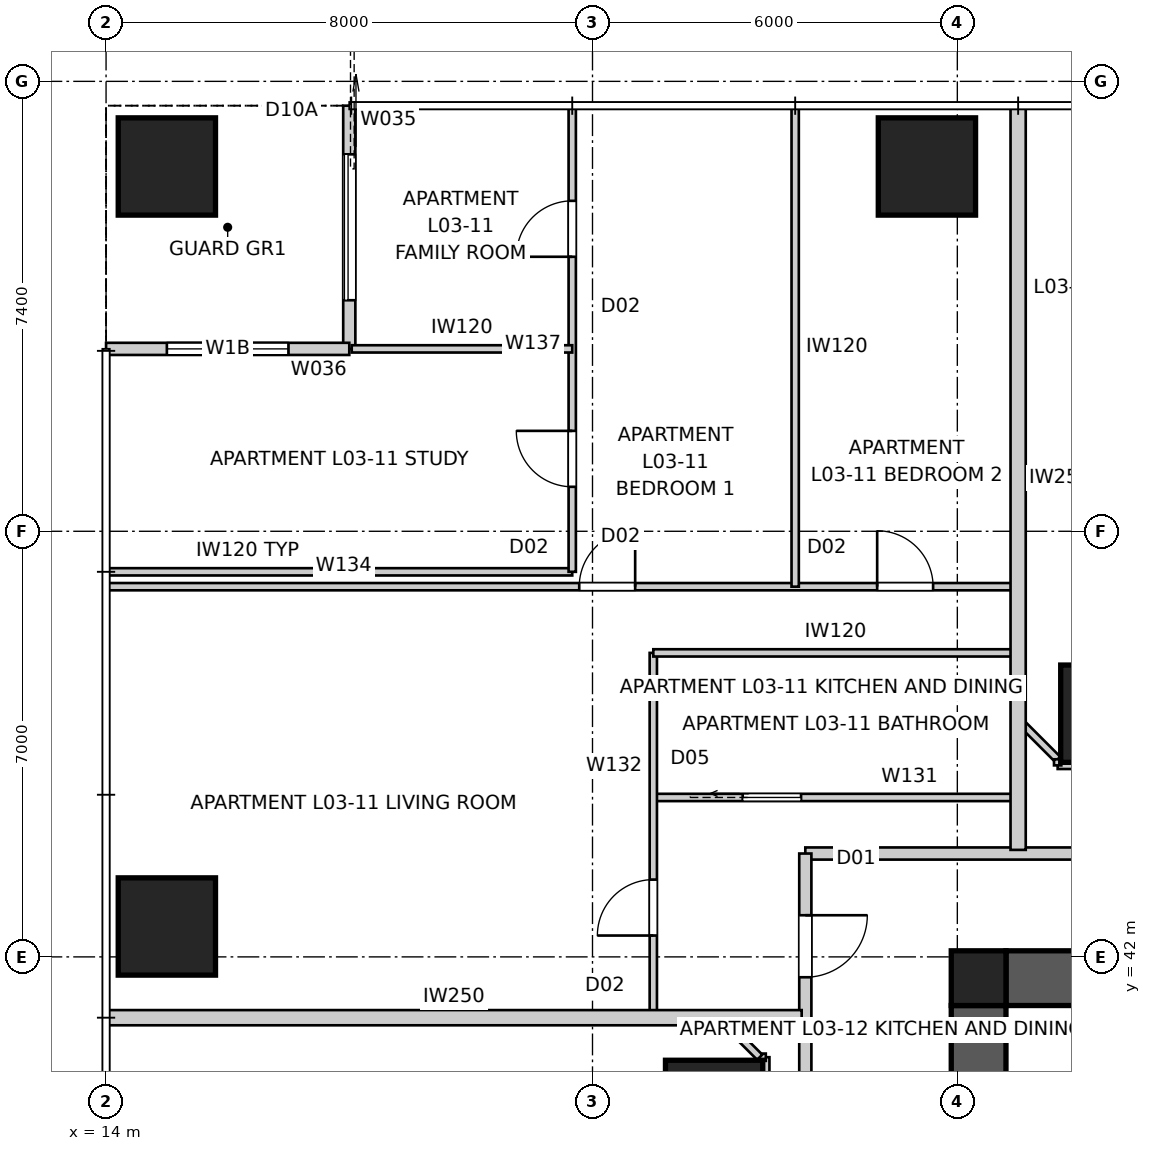
"""IFC4 building model, lengths in metres.
Left out: names, types, materials, properties, quantities, classifications, styles, units other than length and angle.
Written with IfcOpenShell. Run it as: python <this file> out.ifc"""

import sys

from ifc_helpers import new_model, si_unit, direction, frame, frame_2d, origin, origin_2d, place, context, subcontext, project, spatial, polyline, rectangle, outline, extrude, element, fill, save


model = new_model("IFC4")
c1 = context("Model", 3, precision=1e-05, world=origin(), true_north=direction((0.0, 1.0)))
c2 = subcontext(c1, "Body", "Model", "MODEL_VIEW")
j1 = project(units=[si_unit("LENGTHUNIT", "METRE"), si_unit("PLANEANGLEUNIT", "RADIAN")], contexts=[c1])
p1 = place(None, origin())
s1 = spatial("IfcSite", under=j1, at=p1, CompositionType="ELEMENT")
p2 = place(p1, origin())
s2 = spatial("IfcBuilding", under=s1, at=p2, CompositionType="ELEMENT")
p3 = place(p2, frame((0.0, 0.0, 15.0)))
s3 = spatial("IfcBuildingStorey", under=s2, at=p3, CompositionType="ELEMENT", Elevation=15.0)
p4 = place(p3, frame((28.8, 41.65, 0.0), z_axis=(0.0, 0.0, 1.0), x_axis=(1.0, 0.0, 0.0)))
e1 = element("IfcWall", 1, at=p4, inside=s3, PredefinedType="SHEAR", context=c2, shape_type="SweptSolid", body=[
    extrude(outline(polyline([(0.0, -0.45), (22.4, -0.45), (22.4, -0.025), (22.85, -0.025), (22.85, 0.025), (22.4, 0.025), (22.4, 0.45), (0.0, 0.45), (0.0, 0.025), (-0.45, 0.025), (-0.45, -0.025), (0.0, -0.025), (0.0, -0.45)])), origin(), (0.0, 0.0, 1.0), 3.4),
])
p5 = place(p3, frame((28.35, 41.2, 0.0), z_axis=(0.0, 0.0, 1.0), x_axis=(0.0, -1.0, 0.0)))
e2 = element("IfcWall", 2, at=p5, inside=s3, PredefinedType="SHEAR", context=c2, shape_type="SweptSolid", body=[
    extrude(outline(polyline([(0.0, -0.45), (22.4, -0.45), (22.4, -0.025), (22.85, -0.025), (22.85, 0.025), (22.4, 0.025), (22.4, 0.45), (0.0, 0.45), (0.0, 0.025), (-0.45, 0.025), (-0.45, -0.025), (0.0, -0.025), (0.0, -0.45)])), origin(), (0.0, 0.0, 1.0), 3.4),
])
p6 = place(p5, frame((11.14, 0.0, 0.0)))
e3 = element("IfcOpeningElement", 3, at=p6, cuts=e2, PredefinedType="OPENING", context=c2, shape_type="SweptSolid", body=[
    extrude(rectangle(XDim=1.02, YDim=2.4, at=frame_2d((0.51, 1.2))), frame((0.0, 0.46, 0.0), z_axis=(0.0, -1.0, 0.0), x_axis=(1.0, 0.0, 0.0)), (0.0, 0.0, 1.0), 0.92),
])
p7 = place(p3, frame((28.35, 41.65, 0.0), z_axis=(0.0, 0.0, 1.0), x_axis=(1.0, 0.0, 0.0)))
e4 = element("IfcColumn", 4, at=p7, inside=s3, PredefinedType="COLUMN", context=c2, shape_type="SweptSolid", body=[
    extrude(rectangle(XDim=0.9, YDim=0.9, at=origin_2d()), origin(), (0.0, 0.0, 1.0), 3.4),
])
for number, where, z_axis, x_axis in (
    (5, (27.5, 55.0, 0.0), (0.0, 0.0, 1.0), (1.0, 0.0, 0.0)),
    (6, (15.0, 55.0, 0.0), (0.0, 0.0, 1.0), (1.0, 0.0, 0.0)),
    (7, (15.0, 42.5, 0.0), (0.0, 0.0, 1.0), (1.0, 0.0, 0.0)),
    (8, (30.5, 46.0, 0.0), (0.0, 0.0, 1.0), (1.0, 0.0, 0.0)),
    (9, (24.0, 39.5, 0.0), (0.0, 0.0, 1.0), (1.0, 0.0, 0.0)),
):
    element("IfcColumn", number, at=place(p3, frame(where, z_axis=z_axis, x_axis=x_axis)), inside=s3, PredefinedType="COLUMN", context=c2, shape_type="SweptSolid", body=[
        extrude(rectangle(XDim=1.6, YDim=1.6, at=origin_2d()), origin(), (0.0, 0.0, 1.0), 3.4),
    ])
p8 = place(p3, frame((18.0, 56.0, 0.0), z_axis=(0.0, 0.0, 1.0), x_axis=(0.0, -1.0, 0.0)))
e10 = element("IfcWall", 10, at=p8, inside=s3, PredefinedType="SOLIDWALL", context=c2, shape_type="SweptSolid", body=[
    extrude(rectangle(XDim=4.0, YDim=0.2, at=frame_2d((2.0, 0.0))), origin(), (0.0, 0.0, 1.0), 3.25),
])
p9 = place(p8, frame((0.8, 0.0, 0.0)))
e11 = element("IfcOpeningElement", 11, at=p9, cuts=e10, PredefinedType="OPENING", context=c2, shape_type="SweptSolid", body=[
    extrude(rectangle(XDim=2.4, YDim=2.1, at=frame_2d((1.2, 1.05))), frame((0.0, 0.11, 0.0), z_axis=(0.0, -1.0, 0.0), x_axis=(1.0, 0.0, 0.0)), (0.0, 0.0, 1.0), 0.22),
])
p10 = place(p3, frame((18.0, 52.0, 0.0), z_axis=(0.0, 0.0, 1.0), x_axis=(-1.0, 0.0, 0.0)))
e12 = element("IfcWall", 12, at=p10, inside=s3, PredefinedType="SOLIDWALL", context=c2, shape_type="SweptSolid", body=[
    extrude(rectangle(XDim=4.0, YDim=0.2, at=frame_2d((2.0, 0.0))), origin(), (0.0, 0.0, 1.0), 3.25),
])
p11 = place(p10, frame((1.0, 0.0, 0.45)))
e13 = element("IfcOpeningElement", 13, at=p11, cuts=e12, PredefinedType="OPENING", context=c2, shape_type="SweptSolid", body=[
    extrude(rectangle(XDim=2.0, YDim=1.8, at=frame_2d((1.0, 0.9))), frame((0.0, 0.11, 0.0), z_axis=(0.0, -1.0, 0.0), x_axis=(1.0, 0.0, 0.0)), (0.0, 0.0, 1.0), 0.22),
])
p12 = place(p3, frame((54.5, 43.7, 0.0), z_axis=(0.0, 0.0, 1.0), x_axis=(-1.0, 0.0, 0.0)))
e14 = element("IfcWall", 14, at=p12, inside=s3, PredefinedType="PARTITIONING", context=c2, shape_type="SweptSolid", body=[
    extrude(rectangle(XDim=29.0, YDim=0.2, at=frame_2d((14.5, 0.0))), origin(), (0.0, 0.0, 1.0), 3.25),
])
p13 = place(p12, frame((22.253, 0.0, 0.0)))
e15 = element("IfcOpeningElement", 15, at=p13, cuts=e14, PredefinedType="OPENING", context=c2, shape_type="SweptSolid", body=[
    extrude(rectangle(XDim=1.02, YDim=2.34, at=frame_2d((0.51, 1.17))), frame((0.0, 0.11, 0.0), z_axis=(0.0, -1.0, 0.0), x_axis=(1.0, 0.0, 0.0)), (0.0, 0.0, 1.0), 0.22),
])
p14 = place(p12, frame((5.393, 0.0, 0.0)))
e16 = element("IfcOpeningElement", 16, at=p14, cuts=e14, PredefinedType="OPENING", context=c2, shape_type="SweptSolid", body=[
    extrude(rectangle(XDim=1.02, YDim=2.34, at=frame_2d((0.51, 1.17))), frame((0.0, 0.11, 0.0), z_axis=(0.0, -1.0, 0.0), x_axis=(1.0, 0.0, 0.0)), (0.0, 0.0, 1.0), 0.22),
])
p15 = place(p12, frame((1.281, 0.0, 0.0)))
e17 = element("IfcOpeningElement", 17, at=p15, cuts=e14, PredefinedType="OPENING", context=c2, shape_type="SweptSolid", body=[
    extrude(rectangle(XDim=1.02, YDim=2.34, at=frame_2d((0.51, 1.17))), frame((0.0, 0.11, 0.0), z_axis=(0.0, -1.0, 0.0), x_axis=(1.0, 0.0, 0.0)), (0.0, 0.0, 1.0), 0.22),
])
p16 = place(p3, frame((25.5, 43.7, 0.0), z_axis=(0.0, 0.0, 1.0), x_axis=(0.0, -1.0, 0.0)))
e18 = element("IfcWall", 18, at=p16, inside=s3, PredefinedType="PARTITIONING", context=c2, shape_type="SweptSolid", body=[
    extrude(rectangle(XDim=27.4, YDim=0.2, at=frame_2d((13.7, 0.0))), origin(), (0.0, 0.0, 1.0), 3.25),
])
p17 = place(p16, frame((5.493, 0.0, 0.0)))
e19 = element("IfcOpeningElement", 19, at=p17, cuts=e18, PredefinedType="OPENING", context=c2, shape_type="SweptSolid", body=[
    extrude(rectangle(XDim=1.02, YDim=2.34, at=frame_2d((0.51, 1.17))), frame((0.0, 0.11, 0.0), z_axis=(0.0, -1.0, 0.0), x_axis=(1.0, 0.0, 0.0)), (0.0, 0.0, 1.0), 0.22),
])
p18 = place(p16, frame((15.16, 0.0, 0.0)))
e20 = element("IfcOpeningElement", 20, at=p18, cuts=e18, PredefinedType="OPENING", context=c2, shape_type="SweptSolid", body=[
    extrude(rectangle(XDim=1.02, YDim=2.34, at=frame_2d((0.51, 1.17))), frame((0.0, 0.11, 0.0), z_axis=(0.0, -1.0, 0.0), x_axis=(1.0, 0.0, 0.0)), (0.0, 0.0, 1.0), 0.22),
])
p19 = place(p16, frame((1.015, 0.0, 0.0)))
e21 = element("IfcOpeningElement", 21, at=p19, cuts=e18, PredefinedType="OPENING", context=c2, shape_type="SweptSolid", body=[
    extrude(rectangle(XDim=1.02, YDim=2.34, at=frame_2d((0.51, 1.17))), frame((0.0, 0.11, 0.0), z_axis=(0.0, -1.0, 0.0), x_axis=(1.0, 0.0, 0.0)), (0.0, 0.0, 1.0), 0.22),
])
p20 = place(p3, frame((29.0, 56.0, 0.0), z_axis=(0.0, 0.0, 1.0), x_axis=(0.0, -1.0, 0.0)))
e22 = element("IfcWall", 22, at=p20, inside=s3, PredefinedType="PARTITIONING", context=c2, shape_type="SweptSolid", body=[
    extrude(rectangle(XDim=12.24, YDim=0.25, at=frame_2d((6.12, 0.0))), origin(), (0.0, 0.0, 1.0), 3.25),
])
p21 = place(p3, frame((14.0, 41.0, 0.0), z_axis=(0.0, 0.0, 1.0), x_axis=(1.0, 0.0, 0.0)))
e23 = element("IfcWall", 23, at=p21, inside=s3, PredefinedType="PARTITIONING", context=c2, shape_type="SweptSolid", body=[
    extrude(rectangle(XDim=11.44, YDim=0.25, at=frame_2d((5.72, 0.0))), origin(), (0.0, 0.0, 1.0), 3.25),
])
p22 = place(p3, frame((29.0, 45.9, 0.0), z_axis=(0.0, 0.0, 1.0), x_axis=(0.707106781187, -0.707106781187, 0.0)))
e24 = element("IfcWall", 24, at=p22, inside=s3, PredefinedType="PARTITIONING", context=c2, shape_type="SweptSolid", body=[
    extrude(rectangle(XDim=0.919, YDim=0.12, at=frame_2d((0.459, 0.0))), origin(), (0.0, 0.0, 1.0), 3.25),
])
p23 = place(p3, frame((29.65, 45.15, 0.0), z_axis=(0.0, 0.0, 1.0), x_axis=(1.0, 0.0, 0.0)))
e25 = element("IfcWall", 25, at=p23, inside=s3, PredefinedType="PARTITIONING", context=c2, shape_type="SweptSolid", body=[
    extrude(rectangle(XDim=1.7, YDim=0.12, at=frame_2d((0.85, 0.0))), origin(), (0.0, 0.0, 1.0), 3.25),
])
p24 = place(p3, frame((23.0, 44.622, 0.0), z_axis=(0.0, 0.0, 1.0), x_axis=(1.0, 0.0, 0.0)))
e26 = element("IfcWall", 26, at=p24, inside=s3, PredefinedType="PARTITIONING", context=c2, shape_type="SweptSolid", body=[
    extrude(rectangle(XDim=6.0, YDim=0.12, at=frame_2d((3.0, 0.0))), origin(), (0.0, 0.0, 1.0), 2.637),
])
p25 = place(p24, frame((1.47, 0.0, 0.0)))
e27 = element("IfcOpeningElement", 27, at=p25, cuts=e26, PredefinedType="OPENING", context=c2, shape_type="SweptSolid", body=[
    extrude(rectangle(XDim=0.96, YDim=2.1, at=frame_2d((0.48, 1.05))), frame((0.0, 0.07, 0.0), z_axis=(0.0, -1.0, 0.0), x_axis=(1.0, 0.0, 0.0)), (0.0, 0.0, 1.0), 0.14),
])
p26 = place(p3, frame((23.0, 41.0, 0.0), z_axis=(0.0, 0.0, 1.0), x_axis=(0.0, 1.0, 0.0)))
e28 = element("IfcWall", 28, at=p26, inside=s3, PredefinedType="PARTITIONING", context=c2, shape_type="SweptSolid", body=[
    extrude(rectangle(XDim=6.0, YDim=0.12, at=frame_2d((3.0, 0.0))), origin(), (0.0, 0.0, 1.0), 3.25),
])
p27 = place(p26, frame((1.351, 0.0, 0.0)))
e29 = element("IfcOpeningElement", 29, at=p27, cuts=e28, PredefinedType="OPENING", context=c2, shape_type="SweptSolid", body=[
    extrude(rectangle(XDim=0.92, YDim=2.34, at=frame_2d((0.46, 1.17))), frame((0.0, 0.07, 0.0), z_axis=(0.0, -1.0, 0.0), x_axis=(1.0, 0.0, 0.0)), (0.0, 0.0, 1.0), 0.14),
])
p28 = place(p3, frame((23.0, 47.0, 0.0), z_axis=(0.0, 0.0, 1.0), x_axis=(1.0, 0.0, 0.0)))
e30 = element("IfcWall", 30, at=p28, inside=s3, PredefinedType="PARTITIONING", context=c2, shape_type="SweptSolid", body=[
    extrude(rectangle(XDim=6.0, YDim=0.12, at=frame_2d((3.0, 0.0))), origin(), (0.0, 0.0, 1.0), 3.25),
])
p29 = place(p3, frame((14.04, 48.089, 0.0), z_axis=(0.0, 0.0, 1.0), x_axis=(1.0, 0.0, 0.0)))
e31 = element("IfcWall", 31, at=p29, inside=s3, PredefinedType="PARTITIONING", context=c2, shape_type="SweptSolid", body=[
    extrude(rectangle(XDim=14.96, YDim=0.12, at=frame_2d((7.48, 0.0))), origin(), (0.0, 0.0, 1.0), 3.25),
])
p30 = place(p29, frame((7.742, 0.0, 0.0)))
e32 = element("IfcOpeningElement", 32, at=p30, cuts=e31, PredefinedType="OPENING", context=c2, shape_type="SweptSolid", body=[
    extrude(rectangle(XDim=0.92, YDim=2.34, at=frame_2d((0.46, 1.17))), frame((0.0, 0.07, 0.0), z_axis=(0.0, -1.0, 0.0), x_axis=(1.0, 0.0, 0.0)), (0.0, 0.0, 1.0), 0.14),
])
p31 = place(p29, frame((12.642, 0.0, 0.0)))
e33 = element("IfcOpeningElement", 33, at=p31, cuts=e31, PredefinedType="OPENING", context=c2, shape_type="SweptSolid", body=[
    extrude(rectangle(XDim=0.92, YDim=2.34, at=frame_2d((0.46, 1.17))), frame((0.0, 0.07, 0.0), z_axis=(0.0, -1.0, 0.0), x_axis=(1.0, 0.0, 0.0)), (0.0, 0.0, 1.0), 0.14),
])
p32 = place(p3, frame((25.333, 55.96, 0.0), z_axis=(0.0, 0.0, 1.0), x_axis=(0.0, -1.0, 0.0)))
e34 = element("IfcWall", 34, at=p32, inside=s3, PredefinedType="PARTITIONING", context=c2, shape_type="SweptSolid", body=[
    extrude(rectangle(XDim=7.871, YDim=0.12, at=frame_2d((3.936, 0.0))), origin(), (0.0, 0.0, 1.0), 2.637),
])
p33 = place(p3, frame((14.04, 48.333, 0.0), z_axis=(0.0, 0.0, 1.0), x_axis=(1.0, 0.0, 0.0)))
e35 = element("IfcWall", 35, at=p33, inside=s3, PredefinedType="PARTITIONING", context=c2, shape_type="SweptSolid", body=[
    extrude(rectangle(XDim=7.627, YDim=0.12, at=frame_2d((3.813, 0.0))), origin(), (0.0, 0.0, 1.0), 3.25),
])
p34 = place(p3, frame((21.667, 48.333, 0.0), z_axis=(0.0, 0.0, 1.0), x_axis=(0.0, 1.0, 0.0)))
e36 = element("IfcWall", 36, at=p34, inside=s3, PredefinedType="PARTITIONING", context=c2, shape_type="SweptSolid", body=[
    extrude(rectangle(XDim=7.627, YDim=0.12, at=frame_2d((3.813, 0.0))), origin(), (0.0, 0.0, 1.0), 3.25),
])
p35 = place(p34, frame((5.182, 0.0, 0.0)))
e37 = element("IfcOpeningElement", 37, at=p35, cuts=e36, PredefinedType="OPENING", context=c2, shape_type="SweptSolid", body=[
    extrude(rectangle(XDim=0.92, YDim=2.34, at=frame_2d((0.46, 1.17))), frame((0.0, 0.07, 0.0), z_axis=(0.0, -1.0, 0.0), x_axis=(1.0, 0.0, 0.0)), (0.0, 0.0, 1.0), 0.14),
])
p36 = place(p34, frame((1.398, 0.0, 0.0)))
e38 = element("IfcOpeningElement", 38, at=p36, cuts=e36, PredefinedType="OPENING", context=c2, shape_type="SweptSolid", body=[
    extrude(rectangle(XDim=0.92, YDim=2.34, at=frame_2d((0.46, 1.17))), frame((0.0, 0.07, 0.0), z_axis=(0.0, -1.0, 0.0), x_axis=(1.0, 0.0, 0.0)), (0.0, 0.0, 1.0), 0.14),
])
p37 = place(p3, frame((18.04, 52.0, 0.0), z_axis=(0.0, 0.0, 1.0), x_axis=(1.0, 0.0, 0.0)))
e39 = element("IfcWall", 39, at=p37, inside=s3, PredefinedType="PARTITIONING", context=c2, shape_type="SweptSolid", body=[
    extrude(rectangle(XDim=3.627, YDim=0.12, at=frame_2d((1.813, 0.0))), origin(), (0.0, 0.0, 1.0), 3.25),
])
p38 = place(p3, frame((24.85, 38.65, 0.0), z_axis=(0.0, 0.0, 1.0), x_axis=(0.0, 1.0, 0.0)))
e40 = element("IfcWall", 40, at=p38, inside=s3, PredefinedType="PARTITIONING", context=c2, shape_type="SweptSolid", body=[
    extrude(rectangle(XDim=1.7, YDim=0.12, at=frame_2d((0.85, 0.0))), origin(), (0.0, 0.0, 1.0), 3.25),
])
p39 = place(p3, frame((24.75, 40.35, 0.0), z_axis=(0.0, 0.0, 1.0), x_axis=(-0.707106781187, 0.707106781187, 0.0)))
e41 = element("IfcWall", 41, at=p39, inside=s3, PredefinedType="PARTITIONING", context=c2, shape_type="SweptSolid", body=[
    extrude(rectangle(XDim=0.919, YDim=0.12, at=frame_2d((0.459, 0.0))), origin(), (0.0, 0.0, 1.0), 3.25),
])
for number, where, z_axis, x_axis in (
    (42, (29.65, 45.15, 0.0), (0.0, 0.0, 1.0), (0.0, 1.0, 0.0)),
    (43, (24.85, 40.35, 0.0), (0.0, 0.0, 1.0), (-1.0, 0.0, 0.0)),
):
    element("IfcWall", number, at=place(p3, frame(where, z_axis=z_axis, x_axis=x_axis)), inside=s3, PredefinedType="PARTITIONING", context=c2, shape_type="SweptSolid", body=[
        extrude(rectangle(XDim=0.1, YDim=0.12, at=frame_2d((0.05, 0.0))), origin(), (0.0, 0.0, 1.0), 3.25),
    ])
p40 = place(p9, origin())
e44 = element("IfcDoor", 44, at=p40, inside=s3, OperationType="SLIDING_TO_LEFT", PredefinedType="DOOR", context=c2, shape_type="SweptSolid", body=[
    extrude(rectangle(XDim=2.4, YDim=2.1, at=frame_2d((1.2, 1.05))), frame((0.0, 0.025, 0.0), z_axis=(0.0, -1.0, 0.0), x_axis=(1.0, 0.0, 0.0)), (0.0, 0.0, 1.0), 0.05),
])
fill(e11, e44)
p41 = place(p11, origin())
e45 = element("IfcWindow", 45, at=p41, inside=s3, PartitioningType="SINGLE_PANEL", PredefinedType="WINDOW", context=c2, shape_type="SweptSolid", body=[
    extrude(rectangle(XDim=2.0, YDim=1.8, at=frame_2d((1.0, 0.9))), frame((0.0, 0.03, 0.0), z_axis=(0.0, -1.0, 0.0), x_axis=(1.0, 0.0, 0.0)), (0.0, 0.0, 1.0), 0.06),
])
fill(e13, e45)
p42 = place(p19, origin())
e46 = element("IfcDoor", 46, at=p42, inside=s3, OperationType="SINGLE_SWING_LEFT", PredefinedType="DOOR", context=c2, shape_type="SweptSolid", body=[
    extrude(rectangle(XDim=1.02, YDim=2.34, at=frame_2d((0.51, 1.17))), frame((0.0, 0.025, 0.0), z_axis=(0.0, -1.0, 0.0), x_axis=(1.0, 0.0, 0.0)), (0.0, 0.0, 1.0), 0.05),
])
fill(e21, e46)
p43 = place(p25, origin())
e47 = element("IfcDoor", 47, at=p43, inside=s3, OperationType="SLIDING_TO_LEFT", PredefinedType="DOOR", context=c2, shape_type="SweptSolid", body=[
    extrude(rectangle(XDim=0.96, YDim=2.1, at=frame_2d((0.48, 1.05))), frame((0.0, 0.025, 0.0), z_axis=(0.0, -1.0, 0.0), x_axis=(1.0, 0.0, 0.0)), (0.0, 0.0, 1.0), 0.05),
])
fill(e27, e47)
p44 = place(p27, origin())
e48 = element("IfcDoor", 48, at=p44, inside=s3, OperationType="SINGLE_SWING_LEFT", PredefinedType="DOOR", context=c2, shape_type="SweptSolid", body=[
    extrude(rectangle(XDim=0.92, YDim=2.34, at=frame_2d((0.46, 1.17))), frame((0.0, 0.025, 0.0), z_axis=(0.0, -1.0, 0.0), x_axis=(1.0, 0.0, 0.0)), (0.0, 0.0, 1.0), 0.05),
])
fill(e29, e48)
p45 = place(p30, origin())
e49 = element("IfcDoor", 49, at=p45, inside=s3, OperationType="SINGLE_SWING_RIGHT", PredefinedType="DOOR", context=c2, shape_type="SweptSolid", body=[
    extrude(rectangle(XDim=0.92, YDim=2.34, at=frame_2d((0.46, 1.17))), frame((0.0, 0.025, 0.0), z_axis=(0.0, -1.0, 0.0), x_axis=(1.0, 0.0, 0.0)), (0.0, 0.0, 1.0), 0.05),
])
fill(e32, e49)
p46 = place(p31, origin())
e50 = element("IfcDoor", 50, at=p46, inside=s3, OperationType="SINGLE_SWING_LEFT", PredefinedType="DOOR", context=c2, shape_type="SweptSolid", body=[
    extrude(rectangle(XDim=0.92, YDim=2.34, at=frame_2d((0.46, 1.17))), frame((0.0, 0.025, 0.0), z_axis=(0.0, -1.0, 0.0), x_axis=(1.0, 0.0, 0.0)), (0.0, 0.0, 1.0), 0.05),
])
fill(e33, e50)
p47 = place(p35, origin())
e51 = element("IfcDoor", 51, at=p47, inside=s3, OperationType="SINGLE_SWING_LEFT", PredefinedType="DOOR", context=c2, shape_type="SweptSolid", body=[
    extrude(rectangle(XDim=0.92, YDim=2.34, at=frame_2d((0.46, 1.17))), frame((0.0, 0.025, 0.0), z_axis=(0.0, -1.0, 0.0), x_axis=(1.0, 0.0, 0.0)), (0.0, 0.0, 1.0), 0.05),
])
fill(e37, e51)
p48 = place(p36, origin())
e52 = element("IfcDoor", 52, at=p48, inside=s3, OperationType="SINGLE_SWING_RIGHT", PredefinedType="DOOR", context=c2, shape_type="SweptSolid", body=[
    extrude(rectangle(XDim=0.92, YDim=2.34, at=frame_2d((0.46, 1.17))), frame((0.0, 0.025, 0.0), z_axis=(0.0, -1.0, 0.0), x_axis=(1.0, 0.0, 0.0)), (0.0, 0.0, 1.0), 0.05),
])
fill(e38, e52)
save(model, sys.argv[1])
